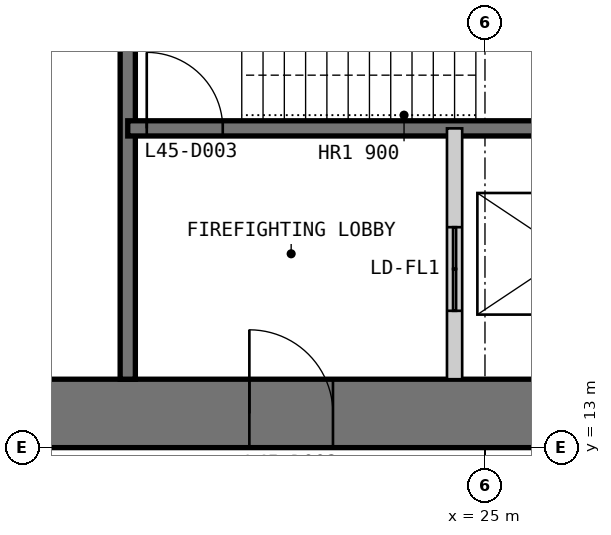
"""IFC4 building model, lengths in metres.
Left out: names, types, materials, properties, quantities, classifications, styles, units other than length and angle.
Written with IfcOpenShell. Run it as: python <this file> out.ifc"""

import sys

from ifc_helpers import new_model, si_unit, direction, frame, frame_2d, origin, place, context, subcontext, project, spatial, polyline, rectangle, outline, extrude, element, fill, save


model = new_model("IFC4")
c1 = context("Model", 3, precision=1e-05, world=origin(), true_north=direction((0.0, 1.0)))
c2 = subcontext(c1, "Body", "Model", "MODEL_VIEW")
j1 = project(units=[si_unit("LENGTHUNIT", "METRE"), si_unit("PLANEANGLEUNIT", "RADIAN")], contexts=[c1])
p1 = place(None, origin())
s1 = spatial("IfcSite", under=j1, at=p1, CompositionType="ELEMENT")
p2 = place(p1, origin())
s2 = spatial("IfcBuilding", under=s1, at=p2, CompositionType="ELEMENT")
p3 = place(p2, frame((0.0, 0.0, 193.8)))
s3 = spatial("IfcBuildingStorey", under=s2, at=p3, CompositionType="ELEMENT", Elevation=193.8)
p4 = place(p3, frame((13.0, 13.45, 0.0), z_axis=(0.0, 0.0, 1.0), x_axis=(1.0, 0.0, 0.0)))
e1 = element("IfcWall", 1, at=p4, inside=s3, PredefinedType="SHEAR", context=c2, shape_type="SweptSolid", body=[
    extrude(outline(polyline([(0.0, -0.45), (24.0, -0.45), (23.1, 0.45), (0.9, 0.45), (0.0, -0.45)])), origin(), (0.0, 0.0, 1.0), 4.0),
])
p5 = place(p4, frame((4.9, 0.0, 0.0)))
e2 = element("IfcOpeningElement", 2, at=p5, cuts=e1, PredefinedType="OPENING", context=c2, shape_type="SweptSolid", body=[
    extrude(rectangle(XDim=1.0, YDim=2.2, at=frame_2d((0.5, 1.1))), frame((0.0, 0.46, 0.0), z_axis=(0.0, -1.0, 0.0), x_axis=(1.0, 0.0, 0.0)), (0.0, 0.0, 1.0), 0.92),
])
p6 = place(p4, frame((8.9, 0.0, 0.0)))
e3 = element("IfcOpeningElement", 3, at=p6, cuts=e1, PredefinedType="OPENING", context=c2, shape_type="SweptSolid", body=[
    extrude(rectangle(XDim=1.1, YDim=2.2, at=frame_2d((0.55, 1.1))), frame((0.0, 0.46, 0.0), z_axis=(0.0, -1.0, 0.0), x_axis=(1.0, 0.0, 0.0)), (0.0, 0.0, 1.0), 0.92),
])
p7 = place(p4, frame((15.05, 0.0, 0.0)))
e4 = element("IfcOpeningElement", 4, at=p7, cuts=e1, PredefinedType="OPENING", context=c2, shape_type="SweptSolid", body=[
    extrude(rectangle(XDim=0.9, YDim=2.2, at=frame_2d((0.45, 1.1))), frame((0.0, 0.46, 0.0), z_axis=(0.0, -1.0, 0.0), x_axis=(1.0, 0.0, 0.0)), (0.0, 0.0, 1.0), 0.92),
])
p8 = place(p4, frame((17.9, 0.0, 0.0)))
e5 = element("IfcOpeningElement", 5, at=p8, cuts=e1, PredefinedType="OPENING", context=c2, shape_type="SweptSolid", body=[
    extrude(rectangle(XDim=1.0, YDim=2.2, at=frame_2d((0.5, 1.1))), frame((0.0, 0.46, 0.0), z_axis=(0.0, -1.0, 0.0), x_axis=(1.0, 0.0, 0.0)), (0.0, 0.0, 1.0), 0.92),
])
p9 = place(p4, frame((21.4, 0.0, 0.0)))
e6 = element("IfcOpeningElement", 6, at=p9, cuts=e1, PredefinedType="OPENING", context=c2, shape_type="SweptSolid", body=[
    extrude(rectangle(XDim=1.0, YDim=2.2, at=frame_2d((0.5, 1.1))), frame((0.0, 0.46, 0.0), z_axis=(0.0, -1.0, 0.0), x_axis=(1.0, 0.0, 0.0)), (0.0, 0.0, 1.0), 0.92),
])
p10 = place(p3, frame((20.3, 13.9, 0.0), z_axis=(0.0, 0.0, 1.0), x_axis=(0.0, 1.0, 0.0)))
e7 = element("IfcWall", 7, at=p10, inside=s3, PredefinedType="SOLIDWALL", context=c2, shape_type="SweptSolid", body=[
    extrude(rectangle(XDim=16.1, YDim=0.2, at=frame_2d((8.05, 0.0))), origin(), (0.0, 0.0, 1.0), 3.8),
])
p11 = place(p10, frame((8.4, 0.0, 0.0)))
e8 = element("IfcOpeningElement", 8, at=p11, cuts=e7, PredefinedType="OPENING", context=c2, shape_type="SweptSolid", body=[
    extrude(rectangle(XDim=0.9, YDim=2.2, at=frame_2d((0.45, 1.1))), frame((0.0, 0.11, 0.0), z_axis=(0.0, -1.0, 0.0), x_axis=(1.0, 0.0, 0.0)), (0.0, 0.0, 1.0), 0.22),
])
p12 = place(p10, frame((13.4, 0.0, 0.0)))
e9 = element("IfcOpeningElement", 9, at=p12, cuts=e7, PredefinedType="OPENING", context=c2, shape_type="SweptSolid", body=[
    extrude(rectangle(XDim=0.9, YDim=2.2, at=frame_2d((0.45, 1.1))), frame((0.0, 0.11, 0.0), z_axis=(0.0, -1.0, 0.0), x_axis=(1.0, 0.0, 0.0)), (0.0, 0.0, 1.0), 0.22),
])
p13 = place(p3, frame((20.3, 17.2, 0.0), z_axis=(0.0, 0.0, 1.0), x_axis=(1.0, 0.0, 0.0)))
e10 = element("IfcWall", 10, at=p13, inside=s3, PredefinedType="SOLIDWALL", context=c2, shape_type="SweptSolid", body=[
    extrude(rectangle(XDim=9.4, YDim=0.2, at=frame_2d((4.7, 0.0))), origin(), (0.0, 0.0, 1.0), 3.8),
])
p14 = place(p13, frame((0.25, 0.0, 0.0)))
e11 = element("IfcOpeningElement", 11, at=p14, cuts=e10, PredefinedType="OPENING", context=c2, shape_type="SweptSolid", body=[
    extrude(rectangle(XDim=1.0, YDim=2.2, at=frame_2d((0.5, 1.1))), frame((0.0, 0.11, 0.0), z_axis=(0.0, -1.0, 0.0), x_axis=(1.0, 0.0, 0.0)), (0.0, 0.0, 1.0), 0.22),
])
p15 = place(p3, frame((24.6, 13.9, 0.0), z_axis=(0.0, 0.0, 1.0), x_axis=(0.0, 1.0, 0.0)))
e12 = element("IfcWall", 12, at=p15, inside=s3, PredefinedType="PARTITIONING", context=c2, shape_type="SweptSolid", body=[
    extrude(rectangle(XDim=3.3, YDim=0.2, at=frame_2d((1.65, 0.0))), origin(), (0.0, 0.0, 1.0), 3.8),
])
p16 = place(p15, frame((0.9, 0.0, 0.0)))
e13 = element("IfcOpeningElement", 13, at=p16, cuts=e12, PredefinedType="OPENING", context=c2, shape_type="SweptSolid", body=[
    extrude(rectangle(XDim=1.1, YDim=2.2, at=frame_2d((0.55, 1.1))), frame((0.0, 0.11, 0.0), z_axis=(0.0, -1.0, 0.0), x_axis=(1.0, 0.0, 0.0)), (0.0, 0.0, 1.0), 0.22),
])
p17 = place(p6, origin())
e14 = element("IfcDoor", 14, at=p17, inside=s3, OperationType="SINGLE_SWING_LEFT", PredefinedType="DOOR", context=c2, shape_type="SweptSolid", body=[
    extrude(rectangle(XDim=1.1, YDim=2.2, at=frame_2d((0.55, 1.1))), frame((0.0, 0.025, 0.0), z_axis=(0.0, -1.0, 0.0), x_axis=(1.0, 0.0, 0.0)), (0.0, 0.0, 1.0), 0.05),
    extrude(outline(polyline([(0.0, 0.0), (0.04, 0.0), (0.04, 2.16), (1.06, 2.16), (1.06, 0.0), (1.1, 0.0), (1.1, 2.2), (0.0, 2.2), (0.0, 0.0)])), frame((0.0, 0.3, 0.0), z_axis=(0.0, -1.0, 0.0), x_axis=(1.0, 0.0, 0.0)), (0.0, 0.0, 1.0), 0.6),
])
fill(e3, e14)
p18 = place(p14, origin())
e15 = element("IfcDoor", 15, at=p18, inside=s3, OperationType="SINGLE_SWING_LEFT", PredefinedType="DOOR", context=c2, shape_type="SweptSolid", body=[
    extrude(rectangle(XDim=1.0, YDim=2.2, at=frame_2d((0.5, 1.1))), frame((0.0, 0.025, 0.0), z_axis=(0.0, -1.0, 0.0), x_axis=(1.0, 0.0, 0.0)), (0.0, 0.0, 1.0), 0.05),
])
fill(e11, e15)
p19 = place(p16, origin())
e16 = element("IfcDoor", 16, at=p19, inside=s3, OperationType="DOUBLE_DOOR_SLIDING", PredefinedType="DOOR", context=c2, shape_type="SweptSolid", body=[
    extrude(rectangle(XDim=1.1, YDim=2.2, at=frame_2d((0.55, 1.1))), frame((0.0, 0.025, 0.0), z_axis=(0.0, -1.0, 0.0), x_axis=(1.0, 0.0, 0.0)), (0.0, 0.0, 1.0), 0.05),
])
fill(e13, e16)
save(model, sys.argv[1])
